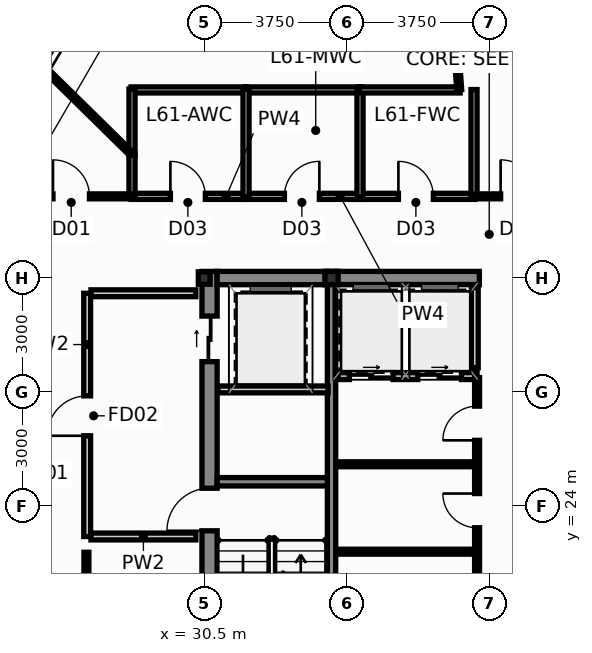
"""IFC4 building model, lengths in metres.
Left out: names, types, materials, properties, quantities, classifications, styles, units other than length and angle.
Written with IfcOpenShell. Run it as: python <this file> out.ifc"""

import sys

from ifc_helpers import new_model, si_unit, direction, frame, frame_2d, origin, origin_2d, place, context, subcontext, project, spatial, rectangle, hollow_rectangle, i_section, extrude, source, transform, mapped, element, fill, save


model = new_model("IFC4")
c1 = context("Model", 3, precision=1e-05, world=origin(), true_north=direction((0.0, 1.0)))
c2 = subcontext(c1, "Body", "Model", "MODEL_VIEW")
j1 = project(units=[si_unit("LENGTHUNIT", "METRE"), si_unit("PLANEANGLEUNIT", "RADIAN")], contexts=[c1])
p1 = place(None, origin())
s1 = spatial("IfcSite", under=j1, at=p1, CompositionType="ELEMENT")
p2 = place(p1, origin())
s2 = spatial("IfcBuilding", under=s1, at=p2, CompositionType="ELEMENT")
p3 = place(p2, frame((0.0, 0.0, 233.5)))
s3 = spatial("IfcBuildingStorey", under=s2, at=p3, CompositionType="ELEMENT", Elevation=233.5)
m1 = source(origin(), c2, "Body", "SweptSolid", [
    extrude(i_section(OverallWidth=0.311, OverallDepth=0.327, WebThickness=0.016, FlangeThickness=0.025, at=origin_2d()), origin(), (0.0, 0.0, 1.0), 3.65),
])
p4 = place(p3, frame((30.5, 30.0, 0.0), z_axis=(0.0, 0.0, 1.0), x_axis=(1.0, 0.0, 0.0)))
e1 = element("IfcColumn", 1, at=p4, inside=s3, PredefinedType="COLUMN", context=c2, shape_type="MappedRepresentation", body=[
    mapped(m1, transform((0.0, 0.0, 0.0), scale=1.0)),
])
m2 = source(origin(), c2, "Body", "SweptSolid", [
    extrude(hollow_rectangle(XDim=0.35, YDim=0.35, WallThickness=0.016, at=origin_2d()), origin(), (0.0, 0.0, 1.0), 3.65),
])
p5 = place(p3, frame((33.85, 30.0, 0.0), z_axis=(0.0, 0.0, 1.0), x_axis=(1.0, 0.0, 0.0)))
e2 = element("IfcColumn", 2, at=p5, inside=s3, PredefinedType="COLUMN", context=c2, shape_type="MappedRepresentation", body=[
    mapped(m2, transform((0.0, 0.0, 0.0), scale=1.0)),
])
p6 = place(p3, frame((30.64, 17.05, 0.0), z_axis=(0.0, 0.0, 1.0), x_axis=(0.0, 1.0, 0.0)))
e3 = element("IfcWall", 3, at=p6, inside=s3, PredefinedType="SHEAR", context=c2, shape_type="SweptSolid", body=[
    extrude(rectangle(XDim=13.125, YDim=0.4, at=frame_2d((6.562, 0.0))), origin(), (0.0, 0.0, 1.0), 3.65),
])
p7 = place(p6, frame((6.3, 0.0, 0.0)))
e4 = element("IfcOpeningElement", 4, at=p7, cuts=e3, PredefinedType="OPENING", context=c2, shape_type="SweptSolid", body=[
    extrude(rectangle(XDim=1.12, YDim=2.15, at=frame_2d((0.56, 1.075))), frame((0.0, 0.212, 0.0), z_axis=(0.0, -1.0, 0.0), x_axis=(1.0, 0.0, 0.0)), (0.0, 0.0, 1.0), 0.424),
])
p8 = place(p6, frame((10.75, 0.0, 0.0)))
e5 = element("IfcOpeningElement", 5, at=p8, cuts=e3, PredefinedType="OPENING", context=c2, shape_type="SweptSolid", body=[
    extrude(rectangle(XDim=1.2, YDim=2.2, at=frame_2d((0.6, 1.1))), frame((0.0, 0.212, 0.0), z_axis=(0.0, -1.0, 0.0), x_axis=(1.0, 0.0, 0.0)), (0.0, 0.0, 1.0), 0.424),
])
p9 = place(p3, frame((30.84, 30.0, 0.0), z_axis=(0.0, 0.0, 1.0), x_axis=(1.0, 0.0, 0.0)))
e6 = element("IfcWall", 6, at=p9, inside=s3, PredefinedType="SHEAR", context=c2, shape_type="SweptSolid", body=[
    extrude(rectangle(XDim=2.9, YDim=0.35, at=frame_2d((1.45, 0.0))), origin(), (0.0, 0.0, 1.0), 3.65),
])
p10 = place(p3, frame((33.96, 30.0, 0.0), z_axis=(0.0, 0.0, 1.0), x_axis=(1.0, 0.0, 0.0)))
e7 = element("IfcWall", 7, at=p10, inside=s3, PredefinedType="SHEAR", context=c2, shape_type="SweptSolid", body=[
    extrude(rectangle(XDim=3.78, YDim=0.35, at=frame_2d((1.89, 0.0))), origin(), (0.0, 0.0, 1.0), 3.65),
])
p11 = place(p3, frame((33.85, 17.05, 0.0), z_axis=(0.0, 0.0, 1.0), x_axis=(0.0, 1.0, 0.0)))
e8 = element("IfcWall", 8, at=p11, inside=s3, PredefinedType="SHEAR", context=c2, shape_type="SweptSolid", body=[
    extrude(rectangle(XDim=13.125, YDim=0.22, at=frame_2d((6.562, 0.0))), origin(), (0.0, 0.0, 1.0), 3.65),
])
p12 = place(p3, frame((30.84, 24.64, 0.0), z_axis=(0.0, 0.0, 1.0), x_axis=(1.0, 0.0, 0.0)))
e9 = element("IfcWall", 9, at=p12, inside=s3, PredefinedType="SHEAR", context=c2, shape_type="SweptSolid", body=[
    extrude(rectangle(XDim=2.9, YDim=0.22, at=frame_2d((1.45, 0.0))), origin(), (0.0, 0.0, 1.0), 3.65),
])
p13 = place(p3, frame((34.02, 27.42, 0.0), z_axis=(0.0, 0.0, 1.0), x_axis=(1.0, 0.0, 0.0)))
e10 = element("IfcWall", 10, at=p13, inside=s3, PredefinedType="PARTITIONING", context=c2, shape_type="SweptSolid", body=[
    extrude(rectangle(XDim=3.66, YDim=0.18, at=frame_2d((1.83, 0.0))), origin(), (0.0, 0.0, 1.0), 3.4),
])
p14 = place(p13, frame((0.3, 0.0, 0.0)))
e11 = element("IfcOpeningElement", 11, at=p14, cuts=e10, PredefinedType="OPENING", context=c2, shape_type="SweptSolid", body=[
    extrude(rectangle(XDim=1.15, YDim=2.2, at=frame_2d((0.575, 1.1))), frame((0.0, 0.102, 0.0), z_axis=(0.0, -1.0, 0.0), x_axis=(1.0, 0.0, 0.0)), (0.0, 0.0, 1.0), 0.204),
])
p15 = place(p13, frame((2.1, 0.0, 0.0)))
e12 = element("IfcOpeningElement", 12, at=p15, cuts=e10, PredefinedType="OPENING", context=c2, shape_type="SweptSolid", body=[
    extrude(rectangle(XDim=1.15, YDim=2.2, at=frame_2d((0.575, 1.1))), frame((0.0, 0.102, 0.0), z_axis=(0.0, -1.0, 0.0), x_axis=(1.0, 0.0, 0.0)), (0.0, 0.0, 1.0), 0.204),
])
p16 = place(p3, frame((37.62, 27.64, 0.0), z_axis=(0.0, 0.0, 1.0), x_axis=(0.0, 1.0, 0.0)))
e13 = element("IfcWall", 13, at=p16, inside=s3, PredefinedType="PARTITIONING", context=c2, shape_type="SweptSolid", body=[
    extrude(rectangle(XDim=2.11, YDim=0.18, at=frame_2d((1.055, 0.0))), origin(), (0.0, 0.0, 1.0), 3.4),
])
p17 = place(p3, frame((27.42, 23.2, 0.0), z_axis=(0.0, 0.0, 1.0), x_axis=(0.0, 1.0, 0.0)))
e14 = element("IfcWall", 14, at=p17, inside=s3, PredefinedType="PARTITIONING", context=c2, shape_type="SweptSolid", body=[
    extrude(rectangle(XDim=6.4, YDim=0.18, at=frame_2d((3.2, 0.0))), origin(), (0.0, 0.0, 1.0), 3.085),
])
p18 = place(p17, frame((2.65, 0.0, 0.0)))
e15 = element("IfcOpeningElement", 15, at=p18, cuts=e14, PredefinedType="OPENING", context=c2, shape_type="SweptSolid", body=[
    extrude(rectangle(XDim=1.05, YDim=2.15, at=frame_2d((0.525, 1.075))), frame((0.0, 0.102, 0.0), z_axis=(0.0, -1.0, 0.0), x_axis=(1.0, 0.0, 0.0)), (0.0, 0.0, 1.0), 0.204),
])
p19 = place(p3, frame((27.52, 23.2, 0.0), z_axis=(0.0, 0.0, 1.0), x_axis=(1.0, 0.0, 0.0)))
e16 = element("IfcWall", 16, at=p19, inside=s3, PredefinedType="PARTITIONING", context=c2, shape_type="SweptSolid", body=[
    extrude(rectangle(XDim=2.76, YDim=0.18, at=frame_2d((1.38, 0.0))), origin(), (0.0, 0.0, 1.0), 3.4),
])
p20 = place(p3, frame((27.52, 29.6, 0.0), z_axis=(0.0, 0.0, 1.0), x_axis=(1.0, 0.0, 0.0)))
e17 = element("IfcWall", 17, at=p20, inside=s3, PredefinedType="PARTITIONING", context=c2, shape_type="SweptSolid", body=[
    extrude(rectangle(XDim=2.76, YDim=0.18, at=frame_2d((1.38, 0.0))), origin(), (0.0, 0.0, 1.0), 2.985),
])
p21 = place(p3, frame((30.86, 27.07, 0.0), z_axis=(0.0, 0.0, 1.0), x_axis=(1.0, 0.0, 0.0)))
e18 = element("IfcWall", 18, at=p21, inside=s3, PredefinedType="PARTITIONING", context=c2, shape_type="SweptSolid", body=[
    extrude(rectangle(XDim=2.9, YDim=0.18, at=frame_2d((1.45, 0.0))), origin(), (0.0, 0.0, 1.0), 3.4),
])
for number, where, z_axis, x_axis in (
    (19, (34.02, 22.8, 0.0), (0.0, 0.0, 1.0), (1.0, 0.0, 0.0)),
    (20, (34.02, 25.1, 0.0), (0.0, 0.0, 1.0), (1.0, 0.0, 0.0)),
):
    element("IfcWall", number, at=place(p3, frame(where, z_axis=z_axis, x_axis=x_axis)), inside=s3, PredefinedType="PARTITIONING", context=c2, shape_type="SweptSolid", body=[
        extrude(rectangle(XDim=3.58, YDim=0.13, at=frame_2d((1.79, 0.0))), origin(), (0.0, 0.0, 1.0), 3.4),
    ])
p22 = place(p3, frame((37.68, 20.48, 0.0), z_axis=(0.0, 0.0, 1.0), x_axis=(0.0, 1.0, 0.0)))
e21 = element("IfcWall", 21, at=p22, inside=s3, PredefinedType="PARTITIONING", context=c2, shape_type="SweptSolid", body=[
    extrude(rectangle(XDim=6.9, YDim=0.13, at=frame_2d((3.45, 0.0))), origin(), (0.0, 0.0, 1.0), 3.4),
])
p23 = place(p22, frame((0.65, 0.0, 0.0)))
e22 = element("IfcOpeningElement", 22, at=p23, cuts=e21, PredefinedType="OPENING", context=c2, shape_type="SweptSolid", body=[
    extrude(rectangle(XDim=0.9, YDim=2.1, at=frame_2d((0.45, 1.05))), frame((0.0, 0.077, 0.0), z_axis=(0.0, -1.0, 0.0), x_axis=(1.0, 0.0, 0.0)), (0.0, 0.0, 1.0), 0.154),
])
p24 = place(p22, frame((2.95, 0.0, 0.0)))
e23 = element("IfcOpeningElement", 23, at=p24, cuts=e21, PredefinedType="OPENING", context=c2, shape_type="SweptSolid", body=[
    extrude(rectangle(XDim=0.9, YDim=2.1, at=frame_2d((0.45, 1.05))), frame((0.0, 0.077, 0.0), z_axis=(0.0, -1.0, 0.0), x_axis=(1.0, 0.0, 0.0)), (0.0, 0.0, 1.0), 0.154),
])
p25 = place(p22, frame((5.25, 0.0, 0.0)))
e24 = element("IfcOpeningElement", 24, at=p25, cuts=e21, PredefinedType="OPENING", context=c2, shape_type="SweptSolid", body=[
    extrude(rectangle(XDim=0.9, YDim=2.1, at=frame_2d((0.45, 1.05))), frame((0.0, 0.077, 0.0), z_axis=(0.0, -1.0, 0.0), x_axis=(1.0, 0.0, 0.0)), (0.0, 0.0, 1.0), 0.154),
])
p26 = place(p3, frame((28.575, 32.15, 0.0), z_axis=(0.0, 0.0, 1.0), x_axis=(1.0, 0.0, 0.0)))
e25 = element("IfcWall", 25, at=p26, inside=s3, PredefinedType="PLUMBINGWALL", context=c2, shape_type="SweptSolid", body=[
    extrude(rectangle(XDim=3.05, YDim=0.16, at=frame_2d((1.525, 0.0))), origin(), (0.0, 0.0, 1.0), 3.085),
])
p27 = place(p26, frame((1.035, 0.0, 0.0)))
e26 = element("IfcOpeningElement", 26, at=p27, cuts=e25, PredefinedType="OPENING", context=c2, shape_type="SweptSolid", body=[
    extrude(rectangle(XDim=0.92, YDim=2.1, at=frame_2d((0.46, 1.05))), frame((0.0, 0.092, 0.0), z_axis=(0.0, -1.0, 0.0), x_axis=(1.0, 0.0, 0.0)), (0.0, 0.0, 1.0), 0.184),
])
p28 = place(p3, frame((31.575, 32.15, 0.0), z_axis=(0.0, 0.0, 1.0), x_axis=(1.0, 0.0, 0.0)))
e27 = element("IfcWall", 27, at=p28, inside=s3, PredefinedType="PLUMBINGWALL", context=c2, shape_type="SweptSolid", body=[
    extrude(rectangle(XDim=3.05, YDim=0.16, at=frame_2d((1.525, 0.0))), origin(), (0.0, 0.0, 1.0), 3.085),
])
p29 = place(p28, frame((1.035, 0.0, 0.0)))
e28 = element("IfcOpeningElement", 28, at=p29, cuts=e27, PredefinedType="OPENING", context=c2, shape_type="SweptSolid", body=[
    extrude(rectangle(XDim=0.92, YDim=2.1, at=frame_2d((0.46, 1.05))), frame((0.0, 0.092, 0.0), z_axis=(0.0, -1.0, 0.0), x_axis=(1.0, 0.0, 0.0)), (0.0, 0.0, 1.0), 0.184),
])
p30 = place(p3, frame((34.575, 32.15, 0.0), z_axis=(0.0, 0.0, 1.0), x_axis=(1.0, 0.0, 0.0)))
e29 = element("IfcWall", 29, at=p30, inside=s3, PredefinedType="PLUMBINGWALL", context=c2, shape_type="SweptSolid", body=[
    extrude(rectangle(XDim=3.05, YDim=0.16, at=frame_2d((1.525, 0.0))), origin(), (0.0, 0.0, 1.0), 3.085),
])
p31 = place(p30, frame((1.035, 0.0, 0.0)))
e30 = element("IfcOpeningElement", 30, at=p31, cuts=e29, PredefinedType="OPENING", context=c2, shape_type="SweptSolid", body=[
    extrude(rectangle(XDim=0.92, YDim=2.1, at=frame_2d((0.46, 1.05))), frame((0.0, 0.092, 0.0), z_axis=(0.0, -1.0, 0.0), x_axis=(1.0, 0.0, 0.0)), (0.0, 0.0, 1.0), 0.184),
])
for number, where, z_axis, x_axis in (
    (31, (28.575, 34.95, 0.0), (0.0, 0.0, 1.0), (1.0, 0.0, 0.0)),
    (32, (31.575, 34.95, 0.0), (0.0, 0.0, 1.0), (1.0, 0.0, 0.0)),
):
    element("IfcWall", number, at=place(p3, frame(where, z_axis=z_axis, x_axis=x_axis)), inside=s3, PredefinedType="PLUMBINGWALL", context=c2, shape_type="SweptSolid", body=[
        extrude(rectangle(XDim=3.05, YDim=0.16, at=frame_2d((1.525, 0.0))), origin(), (0.0, 0.0, 1.0), 3.085),
    ])
p32 = place(p3, frame((31.6, 32.125, 0.0), z_axis=(0.0, 0.0, 1.0), x_axis=(0.0, 1.0, 0.0)))
e33 = element("IfcWall", 33, at=p32, inside=s3, PredefinedType="PLUMBINGWALL", context=c2, shape_type="SweptSolid", body=[
    extrude(rectangle(XDim=2.85, YDim=0.16, at=frame_2d((1.425, 0.0))), origin(), (0.0, 0.0, 1.0), 2.985),
])
p33 = place(p3, frame((34.6, 32.125, 0.0), z_axis=(0.0, 0.0, 1.0), x_axis=(0.0, 1.0, 0.0)))
e34 = element("IfcWall", 34, at=p33, inside=s3, PredefinedType="PLUMBINGWALL", context=c2, shape_type="SweptSolid", body=[
    extrude(rectangle(XDim=2.85, YDim=0.16, at=frame_2d((1.425, 0.0))), origin(), (0.0, 0.0, 1.0), 3.4),
])
p34 = place(p3, frame((37.6, 32.125, 0.0), z_axis=(0.0, 0.0, 1.0), x_axis=(0.0, 1.0, 0.0)))
e35 = element("IfcWall", 35, at=p34, inside=s3, PredefinedType="PLUMBINGWALL", context=c2, shape_type="SweptSolid", body=[
    extrude(rectangle(XDim=2.835, YDim=0.16, at=frame_2d((1.417, 0.0))), origin(), (0.0, 0.0, 1.0), 3.4),
])
p35 = place(p3, frame((34.575, 34.95, 0.0), z_axis=(0.0, 0.0, 1.0), x_axis=(1.0, 0.0, 0.0)))
e36 = element("IfcWall", 36, at=p35, inside=s3, PredefinedType="PLUMBINGWALL", context=c2, shape_type="SweptSolid", body=[
    extrude(rectangle(XDim=2.66, YDim=0.16, at=frame_2d((1.33, 0.0))), origin(), (0.0, 0.0, 1.0), 3.085),
])
p36 = place(p3, frame((28.6, 33.225, 0.0), z_axis=(0.0, 0.0, 1.0), x_axis=(0.0, 1.0, 0.0)))
e37 = element("IfcWall", 37, at=p36, inside=s3, PredefinedType="PLUMBINGWALL", context=c2, shape_type="SweptSolid", body=[
    extrude(rectangle(XDim=1.75, YDim=0.16, at=frame_2d((0.875, 0.0))), origin(), (0.0, 0.0, 1.0), 2.985),
])
p37 = place(p3, frame((28.6, 32.125, 0.0), z_axis=(0.0, 0.0, 1.0), x_axis=(0.0, 1.0, 0.0)))
e38 = element("IfcWall", 38, at=p37, inside=s3, PredefinedType="PLUMBINGWALL", context=c2, shape_type="SweptSolid", body=[
    extrude(rectangle(XDim=1.15, YDim=0.16, at=frame_2d((0.575, 0.0))), origin(), (0.0, 0.0, 1.0), 3.4),
])
p38 = place(p3, frame((36.127, 50.125, 0.0), z_axis=(0.0, 0.0, 1.0), x_axis=(0.07122423446, -0.997460329249, 0.0)))
e39 = element("IfcWall", 39, at=p38, inside=s3, PredefinedType="PARTITIONING", context=c2, shape_type="SweptSolid", body=[
    extrude(rectangle(XDim=15.209, YDim=0.13, at=frame_2d((7.604, 0.0))), origin(), (0.0, 0.0, 1.0), 3.4),
])
p39 = place(p38, frame((7.172, 0.0, 0.0)))
e40 = element("IfcOpeningElement", 40, at=p39, cuts=e39, PredefinedType="OPENING", context=c2, shape_type="SweptSolid", body=[
    extrude(rectangle(XDim=0.96, YDim=2.15, at=frame_2d((0.48, 1.075))), frame((0.0, 0.077, 0.0), z_axis=(0.0, -1.0, 0.0), x_axis=(1.0, 0.0, 0.0)), (0.0, 0.0, 1.0), 0.154),
])
p40 = place(p3, frame((27.4, 17.105, 0.0), z_axis=(0.0, 0.0, 1.0), x_axis=(0.0, 1.0, 0.0)))
e41 = element("IfcWall", 41, at=p40, inside=s3, PredefinedType="PARTITIONING", context=c2, shape_type="SweptSolid", body=[
    extrude(rectangle(XDim=5.68, YDim=0.13, at=frame_2d((2.84, 0.0))), origin(), (0.0, 0.0, 1.0), 3.085),
])
p41 = place(p40, frame((2.36, 0.0, 0.0)))
e42 = element("IfcOpeningElement", 42, at=p41, cuts=e41, PredefinedType="OPENING", context=c2, shape_type="SweptSolid", body=[
    extrude(rectangle(XDim=0.96, YDim=2.15, at=frame_2d((0.48, 1.075))), frame((0.0, 0.077, 0.0), z_axis=(0.0, -1.0, 0.0), x_axis=(1.0, 0.0, 0.0)), (0.0, 0.0, 1.0), 0.154),
])
p42 = place(p3, frame((26.333, 35.479, 0.0), z_axis=(0.0, 0.0, 1.0), x_axis=(0.713196080007, -0.700964586454, 0.0)))
e43 = element("IfcWall", 43, at=p42, inside=s3, PredefinedType="PARTITIONING", context=c2, shape_type="SweptSolid", body=[
    extrude(rectangle(XDim=3.174, YDim=0.13, at=frame_2d((1.587, 0.0))), origin(), (0.0, 0.0, 1.0), 3.4),
])
p43 = place(p3, frame((24.38, 32.15, 0.0), z_axis=(0.0, 0.0, 1.0), x_axis=(1.0, 0.0, 0.0)))
e44 = element("IfcWall", 44, at=p43, inside=s3, PredefinedType="PARTITIONING", context=c2, shape_type="SweptSolid", body=[
    extrude(rectangle(XDim=4.215, YDim=0.13, at=frame_2d((2.107, 0.0))), origin(), (0.0, 0.0, 1.0), 3.4),
])
p44 = place(p43, frame((2.14, 0.0, 0.0)))
e45 = element("IfcOpeningElement", 45, at=p44, cuts=e44, PredefinedType="OPENING", context=c2, shape_type="SweptSolid", body=[
    extrude(rectangle(XDim=0.96, YDim=2.15, at=frame_2d((0.48, 1.075))), frame((0.0, 0.077, 0.0), z_axis=(0.0, -1.0, 0.0), x_axis=(1.0, 0.0, 0.0)), (0.0, 0.0, 1.0), 0.154),
])
p45 = place(p3, frame((37.605, 32.15, 0.0), z_axis=(0.0, 0.0, 1.0), x_axis=(1.0, 0.0, 0.0)))
e46 = element("IfcWall", 46, at=p45, inside=s3, PredefinedType="PARTITIONING", context=c2, shape_type="SweptSolid", body=[
    extrude(rectangle(XDim=2.35, YDim=0.13, at=frame_2d((1.175, 0.0))), origin(), (0.0, 0.0, 1.0), 3.085),
])
p46 = place(p45, frame((0.695, 0.0, 0.0)))
e47 = element("IfcOpeningElement", 47, at=p46, cuts=e46, PredefinedType="OPENING", context=c2, shape_type="SweptSolid", body=[
    extrude(rectangle(XDim=0.96, YDim=2.15, at=frame_2d((0.48, 1.075))), frame((0.0, 0.077, 0.0), z_axis=(0.0, -1.0, 0.0), x_axis=(1.0, 0.0, 0.0)), (0.0, 0.0, 1.0), 0.154),
])
p47 = place(p7, origin())
e48 = element("IfcDoor", 48, at=p47, inside=s3, OperationType="SINGLE_SWING_LEFT", PredefinedType="DOOR", context=c2, shape_type="SweptSolid", body=[
    extrude(rectangle(XDim=1.12, YDim=2.15, at=frame_2d((0.56, 1.075))), frame((0.0, 0.025, 0.0), z_axis=(0.0, -1.0, 0.0), x_axis=(1.0, 0.0, 0.0)), (0.0, 0.0, 1.0), 0.05),
])
fill(e4, e48)
p48 = place(p8, origin())
e49 = element("IfcDoor", 49, at=p48, inside=s3, OperationType="SLIDING_TO_LEFT", PredefinedType="DOOR", context=c2, shape_type="SweptSolid", body=[
    extrude(rectangle(XDim=1.2, YDim=2.2, at=frame_2d((0.6, 1.1))), frame((0.0, 0.025, 0.0), z_axis=(0.0, -1.0, 0.0), x_axis=(1.0, 0.0, 0.0)), (0.0, 0.0, 1.0), 0.05),
])
fill(e5, e49)
p49 = place(p14, origin())
e50 = element("IfcDoor", 50, at=p49, inside=s3, OperationType="SLIDING_TO_RIGHT", PredefinedType="DOOR", context=c2, shape_type="SweptSolid", body=[
    extrude(rectangle(XDim=1.15, YDim=2.2, at=frame_2d((0.575, 1.1))), frame((0.0, 0.025, 0.0), z_axis=(0.0, -1.0, 0.0), x_axis=(1.0, 0.0, 0.0)), (0.0, 0.0, 1.0), 0.05),
])
fill(e11, e50)
p50 = place(p15, origin())
e51 = element("IfcDoor", 51, at=p50, inside=s3, OperationType="SLIDING_TO_LEFT", PredefinedType="DOOR", context=c2, shape_type="SweptSolid", body=[
    extrude(rectangle(XDim=1.15, YDim=2.2, at=frame_2d((0.575, 1.1))), frame((0.0, 0.025, 0.0), z_axis=(0.0, -1.0, 0.0), x_axis=(1.0, 0.0, 0.0)), (0.0, 0.0, 1.0), 0.05),
])
fill(e12, e51)
p51 = place(p18, origin())
e52 = element("IfcDoor", 52, at=p51, inside=s3, OperationType="SINGLE_SWING_LEFT", PredefinedType="DOOR", context=c2, shape_type="SweptSolid", body=[
    extrude(rectangle(XDim=1.05, YDim=2.15, at=frame_2d((0.525, 1.075))), frame((0.0, 0.025, 0.0), z_axis=(0.0, -1.0, 0.0), x_axis=(1.0, 0.0, 0.0)), (0.0, 0.0, 1.0), 0.05),
])
fill(e15, e52)
p52 = place(p24, origin())
e53 = element("IfcDoor", 53, at=p52, inside=s3, OperationType="SINGLE_SWING_RIGHT", PredefinedType="DOOR", context=c2, shape_type="SweptSolid", body=[
    extrude(rectangle(XDim=0.9, YDim=2.1, at=frame_2d((0.45, 1.05))), frame((0.0, 0.025, 0.0), z_axis=(0.0, -1.0, 0.0), x_axis=(1.0, 0.0, 0.0)), (0.0, 0.0, 1.0), 0.05),
])
fill(e23, e53)
p53 = place(p25, origin())
e54 = element("IfcDoor", 54, at=p53, inside=s3, OperationType="SINGLE_SWING_LEFT", PredefinedType="DOOR", context=c2, shape_type="SweptSolid", body=[
    extrude(rectangle(XDim=0.9, YDim=2.1, at=frame_2d((0.45, 1.05))), frame((0.0, 0.025, 0.0), z_axis=(0.0, -1.0, 0.0), x_axis=(1.0, 0.0, 0.0)), (0.0, 0.0, 1.0), 0.05),
])
fill(e24, e54)
p54 = place(p27, origin())
e55 = element("IfcDoor", 55, at=p54, inside=s3, OperationType="SINGLE_SWING_LEFT", PredefinedType="DOOR", context=c2, shape_type="SweptSolid", body=[
    extrude(rectangle(XDim=0.92, YDim=2.1, at=frame_2d((0.46, 1.05))), frame((0.0, 0.025, 0.0), z_axis=(0.0, -1.0, 0.0), x_axis=(1.0, 0.0, 0.0)), (0.0, 0.0, 1.0), 0.05),
])
fill(e26, e55)
p55 = place(p29, origin())
e56 = element("IfcDoor", 56, at=p55, inside=s3, OperationType="SINGLE_SWING_RIGHT", PredefinedType="DOOR", context=c2, shape_type="SweptSolid", body=[
    extrude(rectangle(XDim=0.92, YDim=2.1, at=frame_2d((0.46, 1.05))), frame((0.0, 0.025, 0.0), z_axis=(0.0, -1.0, 0.0), x_axis=(1.0, 0.0, 0.0)), (0.0, 0.0, 1.0), 0.05),
])
fill(e28, e56)
p56 = place(p31, origin())
e57 = element("IfcDoor", 57, at=p56, inside=s3, OperationType="SINGLE_SWING_LEFT", PredefinedType="DOOR", context=c2, shape_type="SweptSolid", body=[
    extrude(rectangle(XDim=0.92, YDim=2.1, at=frame_2d((0.46, 1.05))), frame((0.0, 0.025, 0.0), z_axis=(0.0, -1.0, 0.0), x_axis=(1.0, 0.0, 0.0)), (0.0, 0.0, 1.0), 0.05),
])
fill(e30, e57)
p57 = place(p44, origin())
e58 = element("IfcDoor", 58, at=p57, inside=s3, OperationType="SINGLE_SWING_LEFT", PredefinedType="DOOR", context=c2, shape_type="SweptSolid", body=[
    extrude(rectangle(XDim=0.96, YDim=2.15, at=frame_2d((0.48, 1.075))), frame((0.0, 0.025, 0.0), z_axis=(0.0, -1.0, 0.0), x_axis=(1.0, 0.0, 0.0)), (0.0, 0.0, 1.0), 0.05),
])
fill(e45, e58)
p58 = place(p46, origin())
e59 = element("IfcDoor", 59, at=p58, inside=s3, OperationType="SINGLE_SWING_LEFT", PredefinedType="DOOR", context=c2, shape_type="SweptSolid", body=[
    extrude(rectangle(XDim=0.96, YDim=2.15, at=frame_2d((0.48, 1.075))), frame((0.0, 0.025, 0.0), z_axis=(0.0, -1.0, 0.0), x_axis=(1.0, 0.0, 0.0)), (0.0, 0.0, 1.0), 0.05),
])
fill(e47, e59)
save(model, sys.argv[1])
